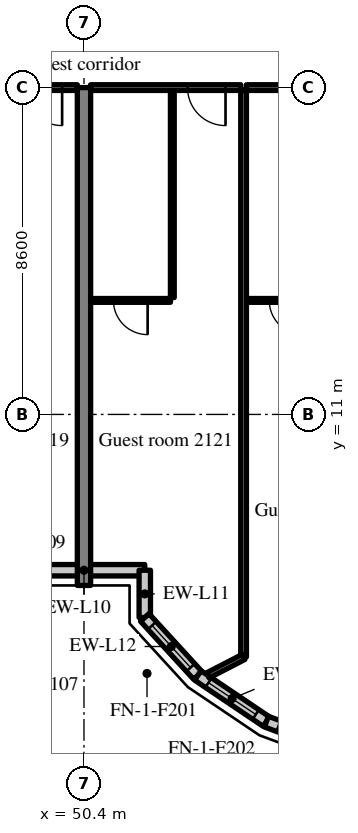
"""IFC4 building model, lengths in metres.
Left out: names, types, materials, properties, quantities, classifications, styles, units other than length and angle.
Written with IfcOpenShell. Run it as: python <this file> out.ifc"""

import sys

from ifc_helpers import new_model, si_unit, direction, frame, frame_2d, origin, place, context, subcontext, project, spatial, rectangle, extrude, source, transform, mapped, element, fill, save


model = new_model("IFC4")
c1 = context("Model", 3, precision=1e-05, world=origin(), true_north=direction((0.0, 1.0)))
c2 = subcontext(c1, "Body", "Model", "MODEL_VIEW")
j1 = project(units=[si_unit("LENGTHUNIT", "METRE"), si_unit("PLANEANGLEUNIT", "RADIAN")], contexts=[c1])
p1 = place(None, origin())
s1 = spatial("IfcSite", under=j1, at=p1, CompositionType="ELEMENT")
p2 = place(p1, origin())
s2 = spatial("IfcBuilding", under=s1, at=p2, CompositionType="ELEMENT")
p3 = place(p2, frame((0.0, 0.0, 91.4)))
s3 = spatial("IfcBuildingStorey", under=s2, at=p3, CompositionType="ELEMENT", Elevation=91.4)
m1 = source(origin(), c2, "Body", "SweptSolid", [
    extrude(rectangle(XDim=13.1, YDim=0.35, at=frame_2d((6.55, 0.0))), origin(), (0.0, 0.0, 1.0), 3.52),
])
p4 = place(p3, frame((50.4, 6.5, 0.0), z_axis=(0.0, 0.0, 1.0), x_axis=(0.0, 1.0, 0.0)))
e1 = element("IfcWall", 1, at=p4, inside=s3, PredefinedType="SHEAR", context=c2, shape_type="MappedRepresentation", body=[
    mapped(m1, transform((0.0, 0.0, 0.0), scale=1.0)),
])
m2 = source(origin(), c2, "Body", "SweptSolid", [
    extrude(rectangle(XDim=3.2, YDim=0.3, at=frame_2d((1.6, 0.0))), origin(), (0.0, 0.0, 1.0), 3.52),
])
p5 = place(p3, frame((48.8, 6.9, 0.0), z_axis=(0.0, 0.0, 1.0), x_axis=(1.0, 0.0, 0.0)))
e2 = element("IfcWall", 2, at=p5, inside=s3, PredefinedType="SOLIDWALL", context=c2, shape_type="MappedRepresentation", body=[
    mapped(m2, transform((0.0, 0.0, 0.0), scale=1.0)),
])
m3 = source(origin(), c2, "Body", "SweptSolid", [
    extrude(rectangle(XDim=1.244, YDim=0.3, at=frame_2d((0.622, 0.0))), origin(), (0.0, 0.0, 1.0), 3.52),
])
p6 = place(p3, frame((52.0, 6.9, 0.0), z_axis=(0.0, 0.0, 1.0), x_axis=(0.0, -1.0, 0.0)))
e3 = element("IfcWall", 3, at=p6, inside=s3, PredefinedType="SOLIDWALL", context=c2, shape_type="MappedRepresentation", body=[
    mapped(m3, transform((0.0, 0.0, 0.0), scale=1.0)),
])
m4 = source(origin(), c2, "Body", "SweptSolid", [
    extrude(rectangle(XDim=2.067, YDim=0.3, at=frame_2d((1.033, 0.0))), origin(), (0.0, 0.0, 1.0), 3.52),
])
p7 = place(p3, frame((52.0, 5.656, 0.0), z_axis=(0.0, 0.0, 1.0), x_axis=(0.675355439877, -0.737492393065, 0.0)))
e4 = element("IfcWall", 4, at=p7, inside=s3, PredefinedType="SOLIDWALL", context=c2, shape_type="MappedRepresentation", body=[
    mapped(m4, transform((0.0, 0.0, 0.0), scale=1.0)),
])
m5 = source(origin(), c2, "Body", "SweptSolid", [
    extrude(rectangle(XDim=1.5, YDim=2.0, at=frame_2d((0.75, 1.0))), frame((0.0, 0.16, 0.0), z_axis=(0.0, -1.0, 0.0), x_axis=(1.0, 0.0, 0.0)), (0.0, 0.0, 1.0), 0.32),
])
p8 = place(p7, frame((0.283, 0.0, 0.9)))
e5 = element("IfcOpeningElement", 5, at=p8, cuts=e4, PredefinedType="OPENING", context=c2, shape_type="MappedRepresentation", body=[
    mapped(m5, transform((0.0, 0.0, 0.0), scale=1.0)),
])
m6 = source(origin(), c2, "Body", "SweptSolid", [
    extrude(rectangle(XDim=2.176, YDim=0.3, at=frame_2d((1.088, 0.0))), origin(), (0.0, 0.0, 1.0), 3.52),
])
p9 = place(p3, frame((53.396, 4.131, 0.0), z_axis=(0.0, 0.0, 1.0), x_axis=(0.829590746428, -0.558371913192, 0.0)))
e6 = element("IfcWall", 6, at=p9, inside=s3, PredefinedType="SOLIDWALL", context=c2, shape_type="MappedRepresentation", body=[
    mapped(m6, transform((0.0, 0.0, 0.0), scale=1.0)),
])
p10 = place(p9, frame((0.338, 0.0, 0.9)))
e7 = element("IfcOpeningElement", 7, at=p10, cuts=e6, PredefinedType="OPENING", context=c2, shape_type="MappedRepresentation", body=[
    mapped(m5, transform((0.0, 0.0, 0.0), scale=1.0)),
])
p11 = place(p3, frame((55.201, 2.917, 0.0), z_axis=(0.0, 0.0, 1.0), x_axis=(0.93754555999, -0.347862505801, 0.0)))
e8 = element("IfcWall", 8, at=p11, inside=s3, PredefinedType="SOLIDWALL", context=c2, shape_type="MappedRepresentation", body=[
    mapped(m6, transform((0.0, 0.0, 0.0), scale=1.0)),
])
p12 = place(p11, frame((0.338, 0.0, 0.9)))
e9 = element("IfcOpeningElement", 9, at=p12, cuts=e8, PredefinedType="OPENING", context=c2, shape_type="MappedRepresentation", body=[
    mapped(m5, transform((0.0, 0.0, 0.0), scale=1.0)),
])
m7 = source(origin(), c2, "Body", "SweptSolid", [
    extrude(rectangle(XDim=3.95, YDim=0.15, at=frame_2d((1.975, 0.0))), origin(), (0.0, 0.0, 1.0), 2.82),
])
p13 = place(p3, frame((46.275, 19.6, 0.0), z_axis=(0.0, 0.0, 1.0), x_axis=(1.0, 0.0, 0.0)))
e10 = element("IfcWall", 10, at=p13, inside=s3, PredefinedType="PARTITIONING", context=c2, shape_type="MappedRepresentation", body=[
    mapped(m7, transform((0.0, 0.0, 0.0), scale=1.0)),
])
m8 = source(origin(), c2, "Body", "SweptSolid", [
    extrude(rectangle(XDim=1.0, YDim=2.1, at=frame_2d((0.5, 1.05))), frame((0.0, 0.085, 0.0), z_axis=(0.0, -1.0, 0.0), x_axis=(1.0, 0.0, 0.0)), (0.0, 0.0, 1.0), 0.17),
])
p14 = place(p13, frame((2.55, 0.0, 0.0)))
e11 = element("IfcOpeningElement", 11, at=p14, cuts=e10, PredefinedType="OPENING", context=c2, shape_type="MappedRepresentation", body=[
    mapped(m8, transform((0.0, 0.0, 0.0), scale=1.0)),
])
m9 = source(origin(), c2, "Body", "SweptSolid", [
    extrude(rectangle(XDim=5.45, YDim=0.1, at=frame_2d((2.725, 0.0))), origin(), (0.0, 0.0, 1.0), 3.52),
])
p15 = place(p3, frame((52.725, 14.075, 0.0), z_axis=(0.0, 0.0, 1.0), x_axis=(0.0, 1.0, 0.0)))
e12 = element("IfcWall", 12, at=p15, inside=s3, PredefinedType="PARTITIONING", context=c2, shape_type="MappedRepresentation", body=[
    mapped(m9, transform((0.0, 0.0, 0.0), scale=1.0)),
])
m10 = source(origin(), c2, "Body", "SweptSolid", [
    extrude(rectangle(XDim=2.1, YDim=0.1, at=frame_2d((1.05, 0.0))), origin(), (0.0, 0.0, 1.0), 3.52),
])
p16 = place(p3, frame((50.575, 14.0, 0.0), z_axis=(0.0, 0.0, 1.0), x_axis=(1.0, 0.0, 0.0)))
e13 = element("IfcWall", 13, at=p16, inside=s3, PredefinedType="PARTITIONING", context=c2, shape_type="MappedRepresentation", body=[
    mapped(m10, transform((0.0, 0.0, 0.0), scale=1.0)),
])
m11 = source(origin(), c2, "Body", "SweptSolid", [
    extrude(rectangle(XDim=0.9, YDim=2.1, at=frame_2d((0.45, 1.05))), frame((0.0, 0.06, 0.0), z_axis=(0.0, -1.0, 0.0), x_axis=(1.0, 0.0, 0.0)), (0.0, 0.0, 1.0), 0.12),
])
p17 = place(p16, frame((0.6, 0.0, 0.0)))
e14 = element("IfcOpeningElement", 14, at=p17, cuts=e13, PredefinedType="OPENING", context=c2, shape_type="MappedRepresentation", body=[
    mapped(m11, transform((0.0, 0.0, 0.0), scale=1.0)),
])
m12 = source(origin(), c2, "Body", "SweptSolid", [
    extrude(rectangle(XDim=3.95, YDim=0.15, at=frame_2d((1.975, 0.0))), origin(), (0.0, 0.0, 1.0), 2.82),
])
p18 = place(p3, frame((50.575, 19.6, 0.0), z_axis=(0.0, 0.0, 1.0), x_axis=(1.0, 0.0, 0.0)))
e15 = element("IfcWall", 15, at=p18, inside=s3, PredefinedType="PARTITIONING", context=c2, shape_type="MappedRepresentation", body=[
    mapped(m12, transform((0.0, 0.0, 0.0), scale=1.0)),
])
p19 = place(p18, frame((2.55, 0.0, 0.0)))
e16 = element("IfcOpeningElement", 16, at=p19, cuts=e15, PredefinedType="OPENING", context=c2, shape_type="MappedRepresentation", body=[
    mapped(m8, transform((0.0, 0.0, 0.0), scale=1.0)),
])
m13 = source(origin(), c2, "Body", "SweptSolid", [
    extrude(rectangle(XDim=2.1, YDim=0.1, at=frame_2d((1.05, 0.0))), origin(), (0.0, 0.0, 1.0), 3.52),
])
p20 = place(p3, frame((54.675, 14.0, 0.0), z_axis=(0.0, 0.0, 1.0), x_axis=(1.0, 0.0, 0.0)))
e17 = element("IfcWall", 17, at=p20, inside=s3, PredefinedType="PARTITIONING", context=c2, shape_type="MappedRepresentation", body=[
    mapped(m13, transform((0.0, 0.0, 0.0), scale=1.0)),
])
p21 = place(p20, frame((0.6, 0.0, 0.0)))
e18 = element("IfcOpeningElement", 18, at=p21, cuts=e17, PredefinedType="OPENING", context=c2, shape_type="MappedRepresentation", body=[
    mapped(m11, transform((0.0, 0.0, 0.0), scale=1.0)),
])
p22 = place(p3, frame((54.675, 19.6, 0.0), z_axis=(0.0, 0.0, 1.0), x_axis=(1.0, 0.0, 0.0)))
e19 = element("IfcWall", 19, at=p22, inside=s3, PredefinedType="PARTITIONING", context=c2, shape_type="MappedRepresentation", body=[
    mapped(m12, transform((0.0, 0.0, 0.0), scale=1.0)),
])
p23 = place(p22, frame((2.55, 0.0, 0.0)))
e20 = element("IfcOpeningElement", 20, at=p23, cuts=e19, PredefinedType="OPENING", context=c2, shape_type="MappedRepresentation", body=[
    mapped(m8, transform((0.0, 0.0, 0.0), scale=1.0)),
])
m14 = source(origin(), c2, "Body", "SweptSolid", [
    extrude(rectangle(XDim=14.906, YDim=0.15, at=frame_2d((7.453, 0.0))), origin(), (0.0, 0.0, 1.0), 3.52),
])
p24 = place(p3, frame((54.6, 4.619, 0.0), z_axis=(0.0, 0.0, 1.0), x_axis=(0.0, 1.0, 0.0)))
e21 = element("IfcWall", 21, at=p24, inside=s3, PredefinedType="PARTITIONING", context=c2, shape_type="MappedRepresentation", body=[
    mapped(m14, transform((0.0, 0.0, 0.0), scale=1.0)),
])
m15 = source(origin(), c2, "Body", "SweptSolid", [
    extrude(rectangle(XDim=1.058, YDim=0.15, at=frame_2d((0.529, 0.0))), origin(), (0.0, 0.0, 1.0), 3.52),
])
p25 = place(p3, frame((53.66, 4.134, 0.0), z_axis=(0.0, 0.0, 1.0), x_axis=(0.888772319209, 0.458348955063, 0.0)))
e22 = element("IfcWall", 22, at=p25, inside=s3, PredefinedType="PARTITIONING", context=c2, shape_type="MappedRepresentation", body=[
    mapped(m15, transform((0.0, 0.0, 0.0), scale=1.0)),
])
m16 = source(origin(), c2, "Body", "SweptSolid", [
    extrude(rectangle(XDim=1.5, YDim=2.0, at=frame_2d((0.75, 1.0))), frame((0.0, 0.03, 0.0), z_axis=(0.0, -1.0, 0.0), x_axis=(1.0, 0.0, 0.0)), (0.0, 0.0, 1.0), 0.06),
])
p26 = place(p8, origin())
e23 = element("IfcWindow", 23, at=p26, inside=s3, PartitioningType="SINGLE_PANEL", PredefinedType="WINDOW", context=c2, shape_type="MappedRepresentation", body=[
    mapped(m16, transform((0.0, 0.0, 0.0), scale=1.0)),
])
fill(e5, e23)
p27 = place(p10, origin())
e24 = element("IfcWindow", 24, at=p27, inside=s3, PartitioningType="SINGLE_PANEL", PredefinedType="WINDOW", context=c2, shape_type="MappedRepresentation", body=[
    mapped(m16, transform((0.0, 0.0, 0.0), scale=1.0)),
])
fill(e7, e24)
p28 = place(p12, origin())
e25 = element("IfcWindow", 25, at=p28, inside=s3, PartitioningType="SINGLE_PANEL", PredefinedType="WINDOW", context=c2, shape_type="MappedRepresentation", body=[
    mapped(m16, transform((0.0, 0.0, 0.0), scale=1.0)),
])
fill(e9, e25)
m17 = source(origin(), c2, "Body", "SweptSolid", [
    extrude(rectangle(XDim=1.0, YDim=2.1, at=frame_2d((0.5, 1.05))), frame((0.0, 0.025, 0.0), z_axis=(0.0, -1.0, 0.0), x_axis=(1.0, 0.0, 0.0)), (0.0, 0.0, 1.0), 0.05),
])
p29 = place(p14, origin())
e26 = element("IfcDoor", 26, at=p29, inside=s3, OperationType="SINGLE_SWING_RIGHT", PredefinedType="DOOR", context=c2, shape_type="MappedRepresentation", body=[
    mapped(m17, transform((0.0, 0.0, 0.0), scale=1.0)),
])
fill(e11, e26)
m18 = source(origin(), c2, "Body", "SweptSolid", [
    extrude(rectangle(XDim=0.9, YDim=2.1, at=frame_2d((0.45, 1.05))), frame((0.0, 0.025, 0.0), z_axis=(0.0, -1.0, 0.0), x_axis=(1.0, 0.0, 0.0)), (0.0, 0.0, 1.0), 0.05),
])
p30 = place(p17, origin())
e27 = element("IfcDoor", 27, at=p30, inside=s3, OperationType="SINGLE_SWING_RIGHT", PredefinedType="DOOR", context=c2, shape_type="MappedRepresentation", body=[
    mapped(m18, transform((0.0, 0.0, 0.0), scale=1.0)),
])
fill(e14, e27)
p31 = place(p19, origin())
e28 = element("IfcDoor", 28, at=p31, inside=s3, OperationType="SINGLE_SWING_RIGHT", PredefinedType="DOOR", context=c2, shape_type="MappedRepresentation", body=[
    mapped(m17, transform((0.0, 0.0, 0.0), scale=1.0)),
])
fill(e16, e28)
p32 = place(p21, origin())
e29 = element("IfcDoor", 29, at=p32, inside=s3, OperationType="SINGLE_SWING_RIGHT", PredefinedType="DOOR", context=c2, shape_type="MappedRepresentation", body=[
    mapped(m18, transform((0.0, 0.0, 0.0), scale=1.0)),
])
fill(e18, e29)
save(model, sys.argv[1])
